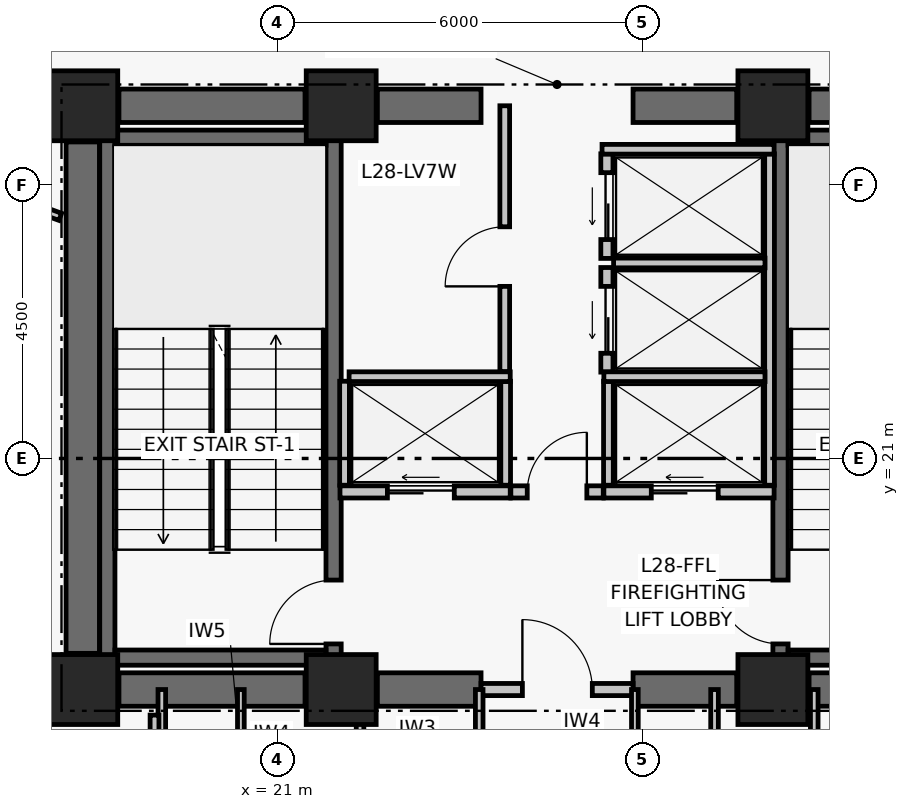
"""IFC4 building model, lengths in metres.
Left out: names, types, materials, properties, quantities, classifications, styles, units other than length and angle.
Written with IfcOpenShell. Run it as: python <this file> out.ifc"""

import sys

from ifc_helpers import new_model, si_unit, direction, frame, frame_2d, origin, origin_2d, place, context, subcontext, project, spatial, rectangle, extrude, element, fill, save


model = new_model("IFC4")
c1 = context("Model", 3, precision=1e-05, world=origin(), true_north=direction((0.0, 1.0)))
c2 = subcontext(c1, "Body", "Model", "MODEL_VIEW")
j1 = project(units=[si_unit("LENGTHUNIT", "METRE"), si_unit("PLANEANGLEUNIT", "RADIAN")], contexts=[c1])
p1 = place(None, origin())
s1 = spatial("IfcSite", under=j1, at=p1, CompositionType="ELEMENT")
p2 = place(p1, origin())
s2 = spatial("IfcBuilding", under=s1, at=p2, CompositionType="ELEMENT")
p3 = place(p2, frame((0.0, 0.0, 115.14)))
s3 = spatial("IfcBuildingStorey", under=s2, at=p3, CompositionType="ELEMENT", Elevation=115.14)
for number, where, z_axis, x_axis in (
    (1, (17.8, 17.2, 0.0), (0.0, 0.0, 1.0), (1.0, 0.0, 0.0)),
    (2, (22.05, 17.2, 0.0), (0.0, 0.0, 1.0), (1.0, 0.0, 0.0)),
    (3, (29.15, 17.2, 0.0), (0.0, 0.0, 1.0), (1.0, 0.0, 0.0)),
    (4, (17.8, 26.8, 0.0), (0.0, 0.0, 1.0), (1.0, 0.0, 0.0)),
    (5, (22.05, 26.8, 0.0), (0.0, 0.0, 1.0), (1.0, 0.0, 0.0)),
    (6, (29.15, 26.8, 0.0), (0.0, 0.0, 1.0), (1.0, 0.0, 0.0)),
):
    element("IfcColumn", number, at=place(p3, frame(where, z_axis=z_axis, x_axis=x_axis)), inside=s3, PredefinedType="COLUMN", context=c2, shape_type="SweptSolid", body=[
        extrude(rectangle(XDim=1.15, YDim=1.15, at=origin_2d()), origin(), (0.0, 0.0, 1.0), 3.72),
    ])
p4 = place(p3, frame((18.395, 17.2, 0.0), z_axis=(0.0, 0.0, 1.0), x_axis=(1.0, 0.0, 0.0)))
e7 = element("IfcWall", 7, at=p4, inside=s3, PredefinedType="SHEAR", context=c2, shape_type="SweptSolid", body=[
    extrude(rectangle(XDim=3.06, YDim=0.55, at=frame_2d((1.53, 0.0))), origin(), (0.0, 0.0, 1.0), 3.44),
])
p5 = place(p3, frame((22.645, 17.2, 0.0), z_axis=(0.0, 0.0, 1.0), x_axis=(1.0, 0.0, 0.0)))
e8 = element("IfcWall", 8, at=p5, inside=s3, PredefinedType="SHEAR", context=c2, shape_type="SweptSolid", body=[
    extrude(rectangle(XDim=1.705, YDim=0.55, at=frame_2d((0.853, 0.0))), origin(), (0.0, 0.0, 1.0), 3.44),
])
p6 = place(p3, frame((26.85, 17.2, 0.0), z_axis=(0.0, 0.0, 1.0), x_axis=(1.0, 0.0, 0.0)))
e9 = element("IfcWall", 9, at=p6, inside=s3, PredefinedType="SHEAR", context=c2, shape_type="SweptSolid", body=[
    extrude(rectangle(XDim=1.705, YDim=0.55, at=frame_2d((0.853, 0.0))), origin(), (0.0, 0.0, 1.0), 3.44),
])
p7 = place(p3, frame((29.745, 17.2, 0.0), z_axis=(0.0, 0.0, 1.0), x_axis=(1.0, 0.0, 0.0)))
e10 = element("IfcWall", 10, at=p7, inside=s3, PredefinedType="SHEAR", context=c2, shape_type="SweptSolid", body=[
    extrude(rectangle(XDim=3.06, YDim=0.55, at=frame_2d((1.53, 0.0))), origin(), (0.0, 0.0, 1.0), 3.44),
])
p8 = place(p3, frame((18.395, 26.8, 0.0), z_axis=(0.0, 0.0, 1.0), x_axis=(1.0, 0.0, 0.0)))
e11 = element("IfcWall", 11, at=p8, inside=s3, PredefinedType="SHEAR", context=c2, shape_type="SweptSolid", body=[
    extrude(rectangle(XDim=3.06, YDim=0.55, at=frame_2d((1.53, 0.0))), origin(), (0.0, 0.0, 1.0), 3.44),
])
p9 = place(p3, frame((22.645, 26.8, 0.0), z_axis=(0.0, 0.0, 1.0), x_axis=(1.0, 0.0, 0.0)))
e12 = element("IfcWall", 12, at=p9, inside=s3, PredefinedType="SHEAR", context=c2, shape_type="SweptSolid", body=[
    extrude(rectangle(XDim=1.705, YDim=0.55, at=frame_2d((0.853, 0.0))), origin(), (0.0, 0.0, 1.0), 3.44),
])
p10 = place(p3, frame((26.85, 26.8, 0.0), z_axis=(0.0, 0.0, 1.0), x_axis=(1.0, 0.0, 0.0)))
e13 = element("IfcWall", 13, at=p10, inside=s3, PredefinedType="SHEAR", context=c2, shape_type="SweptSolid", body=[
    extrude(rectangle(XDim=1.705, YDim=0.55, at=frame_2d((0.853, 0.0))), origin(), (0.0, 0.0, 1.0), 3.44),
])
p11 = place(p3, frame((29.745, 26.8, 0.0), z_axis=(0.0, 0.0, 1.0), x_axis=(1.0, 0.0, 0.0)))
e14 = element("IfcWall", 14, at=p11, inside=s3, PredefinedType="SHEAR", context=c2, shape_type="SweptSolid", body=[
    extrude(rectangle(XDim=3.06, YDim=0.55, at=frame_2d((1.53, 0.0))), origin(), (0.0, 0.0, 1.0), 3.44),
])
p12 = place(p3, frame((17.8, 17.795, 0.0), z_axis=(0.0, 0.0, 1.0), x_axis=(0.0, 1.0, 0.0)))
e15 = element("IfcWall", 15, at=p12, inside=s3, PredefinedType="SHEAR", context=c2, shape_type="SweptSolid", body=[
    extrude(rectangle(XDim=8.41, YDim=0.55, at=frame_2d((4.205, 0.0))), origin(), (0.0, 0.0, 1.0), 3.44),
])
p13 = place(p3, frame((18.204, 17.6, 0.0), z_axis=(0.0, 0.0, 1.0), x_axis=(0.0, 1.0, 0.0)))
e16 = element("IfcWall", 16, at=p13, inside=s3, PredefinedType="SHEAR", context=c2, shape_type="SweptSolid", body=[
    extrude(rectangle(XDim=8.8, YDim=0.25, at=frame_2d((4.4, 0.0))), origin(), (0.0, 0.0, 1.0), 3.44),
])
p14 = place(p3, frame((21.925, 17.6, 0.0), z_axis=(0.0, 0.0, 1.0), x_axis=(0.0, 1.0, 0.0)))
e17 = element("IfcWall", 17, at=p14, inside=s3, PredefinedType="SHEAR", context=c2, shape_type="SweptSolid", body=[
    extrude(rectangle(XDim=8.8, YDim=0.25, at=frame_2d((4.4, 0.0))), origin(), (0.0, 0.0, 1.0), 3.44),
])
p15 = place(p14, frame((0.35, 0.0, 0.0)))
e18 = element("IfcOpeningElement", 18, at=p15, cuts=e17, PredefinedType="OPENING", context=c2, shape_type="SweptSolid", body=[
    extrude(rectangle(XDim=1.05, YDim=2.08, at=frame_2d((0.525, 1.04))), frame((0.0, 0.135, 0.0), z_axis=(0.0, -1.0, 0.0), x_axis=(1.0, 0.0, 0.0)), (0.0, 0.0, 1.0), 0.27),
])
for number, where, z_axis, x_axis in (
    (19, (18.329, 17.725, 0.0), (0.0, 0.0, 1.0), (1.0, 0.0, 0.0)),
    (20, (18.329, 26.275, 0.0), (0.0, 0.0, 1.0), (1.0, 0.0, 0.0)),
):
    element("IfcWall", number, at=place(p3, frame(where, z_axis=z_axis, x_axis=x_axis)), inside=s3, PredefinedType="SHEAR", context=c2, shape_type="SweptSolid", body=[
        extrude(rectangle(XDim=3.471, YDim=0.25, at=frame_2d((1.735, 0.0))), origin(), (0.0, 0.0, 1.0), 3.44),
    ])
p16 = place(p3, frame((29.275, 17.6, 0.0), z_axis=(0.0, 0.0, 1.0), x_axis=(0.0, 1.0, 0.0)))
e21 = element("IfcWall", 21, at=p16, inside=s3, PredefinedType="SHEAR", context=c2, shape_type="SweptSolid", body=[
    extrude(rectangle(XDim=8.8, YDim=0.25, at=frame_2d((4.4, 0.0))), origin(), (0.0, 0.0, 1.0), 3.44),
])
p17 = place(p16, frame((0.35, 0.0, 0.0)))
e22 = element("IfcOpeningElement", 22, at=p17, cuts=e21, PredefinedType="OPENING", context=c2, shape_type="SweptSolid", body=[
    extrude(rectangle(XDim=1.05, YDim=2.08, at=frame_2d((0.525, 1.04))), frame((0.0, 0.135, 0.0), z_axis=(0.0, -1.0, 0.0), x_axis=(1.0, 0.0, 0.0)), (0.0, 0.0, 1.0), 0.27),
])
for number, where, z_axis, x_axis in (
    (23, (29.4, 17.725, 0.0), (0.0, 0.0, 1.0), (1.0, 0.0, 0.0)),
    (24, (29.4, 26.275, 0.0), (0.0, 0.0, 1.0), (1.0, 0.0, 0.0)),
):
    element("IfcWall", number, at=place(p3, frame(where, z_axis=z_axis, x_axis=x_axis)), inside=s3, PredefinedType="SHEAR", context=c2, shape_type="SweptSolid", body=[
        extrude(rectangle(XDim=3.471, YDim=0.25, at=frame_2d((1.736, 0.0))), origin(), (0.0, 0.0, 1.0), 3.44),
    ])
p18 = place(p3, frame((24.35, 17.2, 0.0), z_axis=(0.0, 0.0, 1.0), x_axis=(1.0, 0.0, 0.0)))
e25 = element("IfcWall", 25, at=p18, inside=s3, PredefinedType="PARTITIONING", context=c2, shape_type="SweptSolid", body=[
    extrude(rectangle(XDim=2.5, YDim=0.2, at=frame_2d((1.25, 0.0))), origin(), (0.0, 0.0, 1.0), 2.57),
])
p19 = place(p18, frame((0.68, 0.0, 0.0)))
e26 = element("IfcOpeningElement", 26, at=p19, cuts=e25, PredefinedType="OPENING", context=c2, shape_type="SweptSolid", body=[
    extrude(rectangle(XDim=1.15, YDim=2.08, at=frame_2d((0.575, 1.04))), frame((0.0, 0.11, 0.0), z_axis=(0.0, -1.0, 0.0), x_axis=(1.0, 0.0, 0.0)), (0.0, 0.0, 1.0), 0.22),
])
p20 = place(p3, frame((24.84, 20.45, 0.0), z_axis=(0.0, 0.0, 1.0), x_axis=(1.0, 0.0, 0.0)))
e27 = element("IfcWall", 27, at=p20, inside=s3, PredefinedType="PARTITIONING", context=c2, shape_type="SweptSolid", body=[
    extrude(rectangle(XDim=1.52, YDim=0.2, at=frame_2d((0.76, 0.0))), origin(), (0.0, 0.0, 1.0), 3.44),
])
p21 = place(p20, frame((0.27, 0.0, 0.0)))
e28 = element("IfcOpeningElement", 28, at=p21, cuts=e27, PredefinedType="OPENING", context=c2, shape_type="SweptSolid", body=[
    extrude(rectangle(XDim=0.98, YDim=2.06, at=frame_2d((0.49, 1.03))), frame((0.0, 0.11, 0.0), z_axis=(0.0, -1.0, 0.0), x_axis=(1.0, 0.0, 0.0)), (0.0, 0.0, 1.0), 0.22),
])
p22 = place(p3, frame((22.03, 20.45, 0.0), z_axis=(0.0, 0.0, 1.0), x_axis=(1.0, 0.0, 0.0)))
e29 = element("IfcWall", 29, at=p22, inside=s3, PredefinedType="PARTITIONING", context=c2, shape_type="SweptSolid", body=[
    extrude(rectangle(XDim=2.8, YDim=0.2, at=frame_2d((1.4, 0.0))), origin(), (0.0, 0.0, 1.0), 3.44),
])
p23 = place(p22, frame((0.78, 0.0, 0.0)))
e30 = element("IfcOpeningElement", 30, at=p23, cuts=e29, PredefinedType="OPENING", context=c2, shape_type="SweptSolid", body=[
    extrude(rectangle(XDim=1.1, YDim=2.08, at=frame_2d((0.55, 1.04))), frame((0.0, 0.11, 0.0), z_axis=(0.0, -1.0, 0.0), x_axis=(1.0, 0.0, 0.0)), (0.0, 0.0, 1.0), 0.22),
])
p24 = place(p3, frame((26.37, 20.45, 0.0), z_axis=(0.0, 0.0, 1.0), x_axis=(1.0, 0.0, 0.0)))
e31 = element("IfcWall", 31, at=p24, inside=s3, PredefinedType="PARTITIONING", context=c2, shape_type="SweptSolid", body=[
    extrude(rectangle(XDim=2.8, YDim=0.2, at=frame_2d((1.4, 0.0))), origin(), (0.0, 0.0, 1.0), 3.44),
])
p25 = place(p24, frame((0.78, 0.0, 0.0)))
e32 = element("IfcOpeningElement", 32, at=p25, cuts=e31, PredefinedType="OPENING", context=c2, shape_type="SweptSolid", body=[
    extrude(rectangle(XDim=1.1, YDim=2.08, at=frame_2d((0.55, 1.04))), frame((0.0, 0.11, 0.0), z_axis=(0.0, -1.0, 0.0), x_axis=(1.0, 0.0, 0.0)), (0.0, 0.0, 1.0), 0.22),
])
p26 = place(p3, frame((26.42, 22.42, 0.0), z_axis=(0.0, 0.0, 1.0), x_axis=(0.0, 1.0, 0.0)))
e33 = element("IfcWall", 33, at=p26, inside=s3, PredefinedType="PARTITIONING", context=c2, shape_type="SweptSolid", body=[
    extrude(rectangle(XDim=1.72, YDim=0.2, at=frame_2d((0.86, 0.0))), origin(), (0.0, 0.0, 1.0), 3.44),
])
p27 = place(p26, frame((0.31, 0.0, 0.0)))
e34 = element("IfcOpeningElement", 34, at=p27, cuts=e33, PredefinedType="OPENING", context=c2, shape_type="SweptSolid", body=[
    extrude(rectangle(XDim=1.1, YDim=2.08, at=frame_2d((0.55, 1.04))), frame((0.0, 0.11, 0.0), z_axis=(0.0, -1.0, 0.0), x_axis=(1.0, 0.0, 0.0)), (0.0, 0.0, 1.0), 0.22),
])
p28 = place(p3, frame((26.42, 24.29, 0.0), z_axis=(0.0, 0.0, 1.0), x_axis=(0.0, 1.0, 0.0)))
e35 = element("IfcWall", 35, at=p28, inside=s3, PredefinedType="PARTITIONING", context=c2, shape_type="SweptSolid", body=[
    extrude(rectangle(XDim=1.72, YDim=0.2, at=frame_2d((0.86, 0.0))), origin(), (0.0, 0.0, 1.0), 3.44),
])
p29 = place(p28, frame((0.31, 0.0, 0.0)))
e36 = element("IfcOpeningElement", 36, at=p29, cuts=e35, PredefinedType="OPENING", context=c2, shape_type="SweptSolid", body=[
    extrude(rectangle(XDim=1.1, YDim=2.08, at=frame_2d((0.55, 1.04))), frame((0.0, 0.11, 0.0), z_axis=(0.0, -1.0, 0.0), x_axis=(1.0, 0.0, 0.0)), (0.0, 0.0, 1.0), 0.22),
])
for number, where, z_axis, x_axis in (
    (37, (22.105, 20.56, 0.0), (0.0, 0.0, 1.0), (0.0, 1.0, 0.0)),
    (38, (24.755, 20.56, 0.0), (0.0, 0.0, 1.0), (0.0, 1.0, 0.0)),
):
    element("IfcWall", number, at=place(p3, frame(where, z_axis=z_axis, x_axis=x_axis)), inside=s3, PredefinedType="PARTITIONING", context=c2, shape_type="SweptSolid", body=[
        extrude(rectangle(XDim=1.71, YDim=0.16, at=frame_2d((0.855, 0.0))), origin(), (0.0, 0.0, 1.0), 3.44),
    ])
p30 = place(p3, frame((22.18, 22.345, 0.0), z_axis=(0.0, 0.0, 1.0), x_axis=(1.0, 0.0, 0.0)))
e39 = element("IfcWall", 39, at=p30, inside=s3, PredefinedType="PARTITIONING", context=c2, shape_type="SweptSolid", body=[
    extrude(rectangle(XDim=2.65, YDim=0.16, at=frame_2d((1.325, 0.0))), origin(), (0.0, 0.0, 1.0), 3.44),
])
p31 = place(p3, frame((29.095, 20.56, 0.0), z_axis=(0.0, 0.0, 1.0), x_axis=(0.0, 1.0, 0.0)))
e40 = element("IfcWall", 40, at=p31, inside=s3, PredefinedType="PARTITIONING", context=c2, shape_type="SweptSolid", body=[
    extrude(rectangle(XDim=5.45, YDim=0.16, at=frame_2d((2.725, 0.0))), origin(), (0.0, 0.0, 1.0), 3.44),
])
p32 = place(p3, frame((26.445, 20.56, 0.0), z_axis=(0.0, 0.0, 1.0), x_axis=(0.0, 1.0, 0.0)))
e41 = element("IfcWall", 41, at=p32, inside=s3, PredefinedType="PARTITIONING", context=c2, shape_type="SweptSolid", body=[
    extrude(rectangle(XDim=1.71, YDim=0.16, at=frame_2d((0.855, 0.0))), origin(), (0.0, 0.0, 1.0), 3.44),
])
p33 = place(p3, frame((26.37, 22.345, 0.0), z_axis=(0.0, 0.0, 1.0), x_axis=(1.0, 0.0, 0.0)))
e42 = element("IfcWall", 42, at=p33, inside=s3, PredefinedType="PARTITIONING", context=c2, shape_type="SweptSolid", body=[
    extrude(rectangle(XDim=2.65, YDim=0.16, at=frame_2d((1.325, 0.0))), origin(), (0.0, 0.0, 1.0), 3.44),
])
p34 = place(p3, frame((26.53, 24.215, 0.0), z_axis=(0.0, 0.0, 1.0), x_axis=(1.0, 0.0, 0.0)))
e43 = element("IfcWall", 43, at=p34, inside=s3, PredefinedType="PARTITIONING", context=c2, shape_type="SweptSolid", body=[
    extrude(rectangle(XDim=2.49, YDim=0.16, at=frame_2d((1.245, 0.0))), origin(), (0.0, 0.0, 1.0), 3.44),
])
p35 = place(p3, frame((26.34, 26.085, 0.0), z_axis=(0.0, 0.0, 1.0), x_axis=(1.0, 0.0, 0.0)))
e44 = element("IfcWall", 44, at=p35, inside=s3, PredefinedType="PARTITIONING", context=c2, shape_type="SweptSolid", body=[
    extrude(rectangle(XDim=2.83, YDim=0.16, at=frame_2d((1.415, 0.0))), origin(), (0.0, 0.0, 1.0), 3.44),
])
p36 = place(p3, frame((24.74, 22.43, 0.0), z_axis=(0.0, 0.0, 1.0), x_axis=(0.0, 1.0, 0.0)))
e45 = element("IfcWall", 45, at=p36, inside=s3, PredefinedType="PARTITIONING", context=c2, shape_type="SweptSolid", body=[
    extrude(rectangle(XDim=4.37, YDim=0.16, at=frame_2d((2.185, 0.0))), origin(), (0.0, 0.0, 1.0), 2.57),
])
p37 = place(p36, frame((1.4, 0.0, 0.0)))
e46 = element("IfcOpeningElement", 46, at=p37, cuts=e45, PredefinedType="OPENING", context=c2, shape_type="SweptSolid", body=[
    extrude(rectangle(XDim=0.98, YDim=2.06, at=frame_2d((0.49, 1.03))), frame((0.0, 0.09, 0.0), z_axis=(0.0, -1.0, 0.0), x_axis=(1.0, 0.0, 0.0)), (0.0, 0.0, 1.0), 0.18),
])
p38 = place(p3, frame((19.1, 14.95, 0.0), z_axis=(0.0, 0.0, 1.0), x_axis=(0.0, 1.0, 0.0)))
e47 = element("IfcWall", 47, at=p38, inside=s3, PredefinedType="PARTITIONING", context=c2, shape_type="SweptSolid", body=[
    extrude(rectangle(XDim=2.25, YDim=0.125, at=frame_2d((1.125, 0.0))), origin(), (0.0, 0.0, 1.0), 2.57),
])
p39 = place(p3, frame((20.4, 14.95, 0.0), z_axis=(0.0, 0.0, 1.0), x_axis=(0.0, 1.0, 0.0)))
e48 = element("IfcWall", 48, at=p39, inside=s3, PredefinedType="PARTITIONING", context=c2, shape_type="SweptSolid", body=[
    extrude(rectangle(XDim=2.25, YDim=0.11, at=frame_2d((1.125, 0.0))), origin(), (0.0, 0.0, 1.0), 2.57),
])
for number, where, z_axis, x_axis in (
    (49, (22.36, 14.95, 0.0), (0.0, 0.0, 1.0), (0.0, 1.0, 0.0)),
    (50, (24.32, 14.95, 0.0), (0.0, 0.0, 1.0), (0.0, 1.0, 0.0)),
):
    element("IfcWall", number, at=place(p3, frame(where, z_axis=z_axis, x_axis=x_axis)), inside=s3, PredefinedType="PARTITIONING", context=c2, shape_type="SweptSolid", body=[
        extrude(rectangle(XDim=2.25, YDim=0.125, at=frame_2d((1.125, 0.0))), origin(), (0.0, 0.0, 1.0), 2.57),
    ])
p40 = place(p3, frame((26.88, 14.95, 0.0), z_axis=(0.0, 0.0, 1.0), x_axis=(0.0, 1.0, 0.0)))
e51 = element("IfcWall", 51, at=p40, inside=s3, PredefinedType="PARTITIONING", context=c2, shape_type="SweptSolid", body=[
    extrude(rectangle(XDim=2.25, YDim=0.11, at=frame_2d((1.125, 0.0))), origin(), (0.0, 0.0, 1.0), 2.57),
])
for number, where, z_axis, x_axis in (
    (52, (28.19, 14.95, 0.0), (0.0, 0.0, 1.0), (0.0, 1.0, 0.0)),
    (53, (29.83, 14.95, 0.0), (0.0, 0.0, 1.0), (0.0, 1.0, 0.0)),
):
    element("IfcWall", number, at=place(p3, frame(where, z_axis=z_axis, x_axis=x_axis)), inside=s3, PredefinedType="PARTITIONING", context=c2, shape_type="SweptSolid", body=[
        extrude(rectangle(XDim=2.25, YDim=0.125, at=frame_2d((1.125, 0.0))), origin(), (0.0, 0.0, 1.0), 2.57),
    ])
p41 = place(p3, frame((18.98, 16.78, 0.0), z_axis=(0.0, 0.0, 1.0), x_axis=(0.0, -1.0, 0.0)))
e54 = element("IfcWall", 54, at=p41, inside=s3, PredefinedType="PARTITIONING", context=c2, shape_type="SweptSolid", body=[
    extrude(rectangle(XDim=1.85, YDim=0.145, at=frame_2d((0.925, 0.0))), origin(), (0.0, 0.0, 1.0), 2.57),
])
p42 = place(p3, frame((31.598, 26.8, 0.0), z_axis=(0.0, 0.0, 1.0), x_axis=(-0.831758510993, 0.555137622028, 0.0)))
e55 = element("IfcWall", 55, at=p42, inside=s3, PredefinedType="PARTITIONING", context=c2, shape_type="SweptSolid", body=[
    extrude(rectangle(XDim=2.833, YDim=0.145, at=frame_2d((1.417, 0.0))), origin(), (0.0, 0.0, 1.0), 2.57),
])
p43 = place(p3, frame((15.2, 27.06, 0.0), z_axis=(0.0, 0.0, 1.0), x_axis=(1.0, 0.0, 0.0)))
e56 = element("IfcWall", 56, at=p43, inside=s3, PredefinedType="PARTITIONING", context=c2, shape_type="SweptSolid", body=[
    extrude(rectangle(XDim=2.18, YDim=0.145, at=frame_2d((1.09, 0.0))), origin(), (0.0, 0.0, 1.0), 2.62),
])
p44 = place(p3, frame((17.43, 24.974, 0.0), z_axis=(0.0, 0.0, 1.0), x_axis=(-0.93969321491, 0.34201851098, 0.0)))
e57 = element("IfcWall", 57, at=p44, inside=s3, PredefinedType="PARTITIONING", context=c2, shape_type="SweptSolid", body=[
    extrude(rectangle(XDim=18.929, YDim=0.125, at=frame_2d((9.465, 0.0))), origin(), (0.0, 0.0, 1.0), 2.17),
])
p45 = place(p44, frame((11.528, 0.0, 0.0)))
e58 = element("IfcOpeningElement", 58, at=p45, cuts=e57, PredefinedType="OPENING", context=c2, shape_type="SweptSolid", body=[
    extrude(rectangle(XDim=0.92, YDim=2.05, at=frame_2d((0.46, 1.025))), frame((0.0, 0.073, 0.0), z_axis=(0.0, -1.0, 0.0), x_axis=(1.0, 0.0, 0.0)), (0.0, 0.0, 1.0), 0.145),
])
p46 = place(p15, origin())
e59 = element("IfcDoor", 59, at=p46, inside=s3, OperationType="SINGLE_SWING_LEFT", PredefinedType="DOOR", context=c2, shape_type="SweptSolid", body=[
    extrude(rectangle(XDim=1.05, YDim=2.08, at=frame_2d((0.525, 1.04))), frame((0.0, 0.025, 0.0), z_axis=(0.0, -1.0, 0.0), x_axis=(1.0, 0.0, 0.0)), (0.0, 0.0, 1.0), 0.05),
])
fill(e18, e59)
p47 = place(p17, origin())
e60 = element("IfcDoor", 60, at=p47, inside=s3, OperationType="SINGLE_SWING_RIGHT", PredefinedType="DOOR", context=c2, shape_type="SweptSolid", body=[
    extrude(rectangle(XDim=1.05, YDim=2.08, at=frame_2d((0.525, 1.04))), frame((0.0, 0.025, 0.0), z_axis=(0.0, -1.0, 0.0), x_axis=(1.0, 0.0, 0.0)), (0.0, 0.0, 1.0), 0.05),
])
fill(e22, e60)
p48 = place(p19, origin())
e61 = element("IfcDoor", 61, at=p48, inside=s3, OperationType="SINGLE_SWING_LEFT", PredefinedType="DOOR", context=c2, shape_type="SweptSolid", body=[
    extrude(rectangle(XDim=1.15, YDim=2.08, at=frame_2d((0.575, 1.04))), frame((0.0, 0.025, 0.0), z_axis=(0.0, -1.0, 0.0), x_axis=(1.0, 0.0, 0.0)), (0.0, 0.0, 1.0), 0.05),
])
fill(e26, e61)
p49 = place(p21, origin())
e62 = element("IfcDoor", 62, at=p49, inside=s3, OperationType="SINGLE_SWING_RIGHT", PredefinedType="DOOR", context=c2, shape_type="SweptSolid", body=[
    extrude(rectangle(XDim=0.98, YDim=2.06, at=frame_2d((0.49, 1.03))), frame((0.0, 0.025, 0.0), z_axis=(0.0, -1.0, 0.0), x_axis=(1.0, 0.0, 0.0)), (0.0, 0.0, 1.0), 0.05),
])
fill(e28, e62)
p50 = place(p23, origin())
e63 = element("IfcDoor", 63, at=p50, inside=s3, OperationType="DOUBLE_DOOR_SLIDING", PredefinedType="DOOR", context=c2, shape_type="SweptSolid", body=[
    extrude(rectangle(XDim=1.1, YDim=2.08, at=frame_2d((0.55, 1.04))), frame((0.0, 0.025, 0.0), z_axis=(0.0, -1.0, 0.0), x_axis=(1.0, 0.0, 0.0)), (0.0, 0.0, 1.0), 0.05),
])
fill(e30, e63)
p51 = place(p25, origin())
e64 = element("IfcDoor", 64, at=p51, inside=s3, OperationType="DOUBLE_DOOR_SLIDING", PredefinedType="DOOR", context=c2, shape_type="SweptSolid", body=[
    extrude(rectangle(XDim=1.1, YDim=2.08, at=frame_2d((0.55, 1.04))), frame((0.0, 0.025, 0.0), z_axis=(0.0, -1.0, 0.0), x_axis=(1.0, 0.0, 0.0)), (0.0, 0.0, 1.0), 0.05),
])
fill(e32, e64)
p52 = place(p27, origin())
e65 = element("IfcDoor", 65, at=p52, inside=s3, OperationType="DOUBLE_DOOR_SLIDING", PredefinedType="DOOR", context=c2, shape_type="SweptSolid", body=[
    extrude(rectangle(XDim=1.1, YDim=2.08, at=frame_2d((0.55, 1.04))), frame((0.0, 0.025, 0.0), z_axis=(0.0, -1.0, 0.0), x_axis=(1.0, 0.0, 0.0)), (0.0, 0.0, 1.0), 0.05),
])
fill(e34, e65)
p53 = place(p29, origin())
e66 = element("IfcDoor", 66, at=p53, inside=s3, OperationType="DOUBLE_DOOR_SLIDING", PredefinedType="DOOR", context=c2, shape_type="SweptSolid", body=[
    extrude(rectangle(XDim=1.1, YDim=2.08, at=frame_2d((0.55, 1.04))), frame((0.0, 0.025, 0.0), z_axis=(0.0, -1.0, 0.0), x_axis=(1.0, 0.0, 0.0)), (0.0, 0.0, 1.0), 0.05),
])
fill(e36, e66)
p54 = place(p37, origin())
e67 = element("IfcDoor", 67, at=p54, inside=s3, OperationType="SINGLE_SWING_LEFT", PredefinedType="DOOR", context=c2, shape_type="SweptSolid", body=[
    extrude(rectangle(XDim=0.98, YDim=2.06, at=frame_2d((0.49, 1.03))), frame((0.0, 0.025, 0.0), z_axis=(0.0, -1.0, 0.0), x_axis=(1.0, 0.0, 0.0)), (0.0, 0.0, 1.0), 0.05),
])
fill(e46, e67)
save(model, sys.argv[1])
